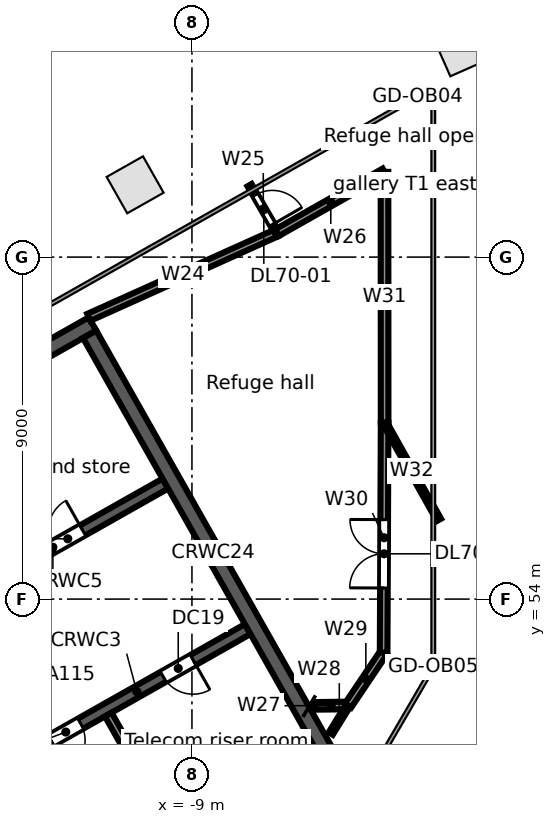
"""IFC4 building model, lengths in metres.
Left out: names, types, materials, properties, quantities, classifications, styles, units other than length and angle.
Written with IfcOpenShell. Run it as: python <this file> out.ifc"""

import sys

from ifc_helpers import new_model, si_unit, direction, frame, frame_2d, origin, origin_2d, place, context, subcontext, project, spatial, rectangle, extrude, element, fill, save


model = new_model("IFC4")
c1 = context("Model", 3, precision=1e-05, world=origin(), true_north=direction((0.0, 1.0)))
c2 = subcontext(c1, "Body", "Model", "MODEL_VIEW")
j1 = project(units=[si_unit("LENGTHUNIT", "METRE"), si_unit("PLANEANGLEUNIT", "RADIAN")], contexts=[c1])
p1 = place(None, origin())
s1 = spatial("IfcSite", under=j1, at=p1, CompositionType="ELEMENT")
p2 = place(p1, origin())
s2 = spatial("IfcBuilding", under=s1, at=p2, CompositionType="ELEMENT")
p3 = place(p2, frame((0.0, 0.0, 312.1)))
s3 = spatial("IfcBuildingStorey", under=s2, at=p3, CompositionType="ELEMENT", Elevation=312.1)
for number, where, z_axis, x_axis in (
    (1, (-10.495, 64.902, 0.0), (0.0, 0.0, 1.0), (-0.87, -0.492, 0.0)),
    (2, (-1.92, 68.483, 0.0), (0.0, 0.0, 1.0), (-0.915, -0.404, 0.0)),
):
    element("IfcColumn", number, at=place(p3, frame(where, z_axis=z_axis, x_axis=x_axis)), inside=s3, PredefinedType="COLUMN", context=c2, shape_type="SweptSolid", body=[
        extrude(rectangle(XDim=1.1, YDim=1.1, at=origin_2d()), origin(), (0.0, 0.0, 1.0), 4.4),
    ])
p4 = place(p3, frame((-13.365, 49.911, 0.0), z_axis=(0.0, 0.0, 1.0), x_axis=(0.870347618718, 0.492437836272, 0.0)))
e3 = element("IfcWall", 3, at=p4, inside=s3, PredefinedType="SOLIDWALL", context=c2, shape_type="SweptSolid", body=[
    extrude(rectangle(XDim=6.7, YDim=0.3, at=frame_2d((3.35, 0.0))), origin(), (0.0, 0.0, 1.0), 4.12),
])
p5 = place(p4, frame((0.75, 0.0, 0.0)))
e4 = element("IfcOpeningElement", 4, at=p5, cuts=e3, PredefinedType="OPENING", context=c2, shape_type="SweptSolid", body=[
    extrude(rectangle(XDim=0.9, YDim=2.1, at=frame_2d((0.45, 1.05))), frame((0.0, 0.16, 0.0), z_axis=(0.0, -1.0, 0.0), x_axis=(1.0, 0.0, 0.0)), (0.0, 0.0, 1.0), 0.32),
])
p6 = place(p4, frame((4.15, 0.0, 0.0)))
e5 = element("IfcOpeningElement", 5, at=p6, cuts=e3, PredefinedType="OPENING", context=c2, shape_type="SweptSolid", body=[
    extrude(rectangle(XDim=0.9, YDim=2.1, at=frame_2d((0.45, 1.05))), frame((0.0, 0.16, 0.0), z_axis=(0.0, -1.0, 0.0), x_axis=(1.0, 0.0, 0.0)), (0.0, 0.0, 1.0), 0.32),
])
p7 = place(p3, frame((-15.618, 53.691, 0.0), z_axis=(0.0, 0.0, 1.0), x_axis=(0.870362830851, 0.492410948978, 0.0)))
e6 = element("IfcWall", 6, at=p7, inside=s3, PredefinedType="SOLIDWALL", context=c2, shape_type="SweptSolid", body=[
    extrude(rectangle(XDim=6.8, YDim=0.3, at=frame_2d((3.4, 0.0))), origin(), (0.0, 0.0, 1.0), 4.12),
])
p8 = place(p7, frame((3.4, 0.0, 0.0)))
e7 = element("IfcOpeningElement", 7, at=p8, cuts=e6, PredefinedType="OPENING", context=c2, shape_type="SweptSolid", body=[
    extrude(rectangle(XDim=0.9, YDim=2.1, at=frame_2d((0.45, 1.05))), frame((0.0, 0.16, 0.0), z_axis=(0.0, -1.0, 0.0), x_axis=(1.0, 0.0, 0.0)), (0.0, 0.0, 1.0), 0.32),
])
p9 = place(p3, frame((-24.672, 53.854, 0.0), z_axis=(0.0, 0.0, 1.0), x_axis=(0.870353598469, 0.492427267353, 0.0)))
e8 = element("IfcWall", 8, at=p9, inside=s3, PredefinedType="SOLIDWALL", context=c2, shape_type="SweptSolid", body=[
    extrude(rectangle(XDim=15.0, YDim=0.4, at=frame_2d((7.5, 0.0))), origin(), (0.0, 0.0, 1.0), 4.12),
])
p10 = place(p3, frame((-11.202, 50.962, 0.0), z_axis=(0.0, 0.0, 1.0), x_axis=(0.492441437811, -0.870345580977, 0.0)))
e9 = element("IfcWall", 9, at=p10, inside=s3, PredefinedType="PARTITIONING", context=c2, shape_type="SweptSolid", body=[
    extrude(rectangle(XDim=4.25, YDim=0.2, at=frame_2d((2.125, 0.0))), origin(), (0.0, 0.0, 1.0), 4.12),
])
p11 = place(p3, frame((-11.692, 60.968, 0.0), z_axis=(0.0, 0.0, 1.0), x_axis=(0.492421663121, -0.870356769198, 0.0)))
e10 = element("IfcWall", 10, at=p11, inside=s3, PredefinedType="SOLIDWALL", context=c2, shape_type="SweptSolid", body=[
    extrude(rectangle(XDim=13.2, YDim=0.4, at=frame_2d((6.6, 0.0))), origin(), (0.0, 0.0, 1.0), 4.12),
])
p12 = place(p3, frame((-11.715, 61.414, 0.0), z_axis=(0.0, 0.0, 1.0), x_axis=(0.911945048706, 0.410312354361, 0.0)))
e11 = element("IfcWall", 11, at=p12, inside=s3, PredefinedType="PARTITIONING", context=c2, shape_type="SweptSolid", body=[
    extrude(rectangle(XDim=5.432, YDim=0.2, at=frame_2d((2.716, 0.0))), origin(), (0.0, 0.0, 1.0), 4.12),
])
p13 = place(p3, frame((-7.484, 64.894, 0.0), z_axis=(0.0, 0.0, 1.0), x_axis=(0.500336716268, -0.865830913258, 0.0)))
e12 = element("IfcWall", 12, at=p13, inside=s3, PredefinedType="PARTITIONING", context=c2, shape_type="SweptSolid", body=[
    extrude(rectangle(XDim=1.445, YDim=0.125, at=frame_2d((0.722, 0.0))), origin(), (0.0, 0.0, 1.0), 4.12),
])
p14 = place(p13, frame((0.3, 0.0, 0.0)))
e13 = element("IfcOpeningElement", 13, at=p14, cuts=e12, PredefinedType="OPENING", context=c2, shape_type="SweptSolid", body=[
    extrude(rectangle(XDim=0.9, YDim=2.1, at=frame_2d((0.45, 1.05))), frame((0.0, 0.073, 0.0), z_axis=(0.0, -1.0, 0.0), x_axis=(1.0, 0.0, 0.0)), (0.0, 0.0, 1.0), 0.145),
])
p15 = place(p3, frame((-6.761, 63.643, 0.0), z_axis=(0.0, 0.0, 1.0), x_axis=(0.870366841372, 0.492403860098, 0.0)))
e14 = element("IfcWall", 14, at=p15, inside=s3, PredefinedType="PARTITIONING", context=c2, shape_type="SweptSolid", body=[
    extrude(rectangle(XDim=3.249, YDim=0.2, at=frame_2d((1.625, 0.0))), origin(), (0.0, 0.0, 1.0), 4.12),
])
p16 = place(p3, frame((-5.758, 51.19, 0.0), z_axis=(0.0, 0.0, 1.0), x_axis=(0.999929677687, 0.011859160192, 0.0)))
e15 = element("IfcWall", 15, at=p16, inside=s3, PredefinedType="PARTITIONING", context=c2, shape_type="SweptSolid", body=[
    extrude(rectangle(XDim=0.844, YDim=0.2, at=frame_2d((0.422, 0.0))), origin(), (0.0, 0.0, 1.0), 3.886),
])
p17 = place(p3, frame((-5.347, 50.463, 0.0), z_axis=(0.0, 0.0, 1.0), x_axis=(0.525419885988, 0.850843078016, 0.0)))
e16 = element("IfcWall", 16, at=p17, inside=s3, PredefinedType="PARTITIONING", context=c2, shape_type="SweptSolid", body=[
    extrude(rectangle(XDim=0.854, YDim=0.125, at=frame_2d((0.427, 0.0))), origin(), (0.0, 0.0, 1.0), 3.886),
])
p18 = place(p3, frame((-4.892, 51.2, 0.0), z_axis=(0.0, 0.0, 1.0), x_axis=(0.557987221871, 0.829849540717, 0.0)))
e17 = element("IfcWall", 17, at=p18, inside=s3, PredefinedType="PARTITIONING", context=c2, shape_type="SweptSolid", body=[
    extrude(rectangle(XDim=1.677, YDim=0.2, at=frame_2d((0.839, 0.0))), origin(), (0.0, 0.0, 1.0), 4.12),
])
p19 = place(p3, frame((-3.956, 52.592, 0.0), z_axis=(0.0, 0.0, 1.0), x_axis=(0.004320747909, 0.999990665525, 0.0)))
e18 = element("IfcWall", 18, at=p19, inside=s3, PredefinedType="PARTITIONING", context=c2, shape_type="SweptSolid", body=[
    extrude(rectangle(XDim=6.046, YDim=0.2, at=frame_2d((3.023, 0.0))), origin(), (0.0, 0.0, 1.0), 3.4),
])
p20 = place(p19, frame((1.7, 0.0, 0.0)))
e19 = element("IfcOpeningElement", 19, at=p20, cuts=e18, PredefinedType="OPENING", context=c2, shape_type="SweptSolid", body=[
    extrude(rectangle(XDim=1.8, YDim=2.1, at=frame_2d((0.9, 1.05))), frame((0.0, 0.11, 0.0), z_axis=(0.0, -1.0, 0.0), x_axis=(1.0, 0.0, 0.0)), (0.0, 0.0, 1.0), 0.22),
])
p21 = place(p3, frame((-3.933, 65.243, 0.0), z_axis=(0.0, 0.0, 1.0), x_axis=(0.000480520385, -0.99999988455, 0.0)))
e20 = element("IfcWall", 20, at=p21, inside=s3, PredefinedType="PARTITIONING", context=c2, shape_type="SweptSolid", body=[
    extrude(rectangle(XDim=6.605, YDim=0.2, at=frame_2d((3.302, 0.0))), origin(), (0.0, 0.0, 1.0), 3.3),
])
p22 = place(p3, frame((-3.93, 58.638, 0.0), z_axis=(0.0, 0.0, 1.0), x_axis=(0.488671964057, -0.872467599137, 0.0)))
e21 = element("IfcWall", 21, at=p22, inside=s3, PredefinedType="PARTITIONING", context=c2, shape_type="SweptSolid", body=[
    extrude(rectangle(XDim=2.926, YDim=0.125, at=frame_2d((1.463, 0.0))), origin(), (0.0, 0.0, 1.0), 3.4),
])
p23 = place(p8, origin())
e22 = element("IfcDoor", 22, at=p23, inside=s3, OperationType="SINGLE_SWING_RIGHT", PredefinedType="DOOR", context=c2, shape_type="SweptSolid", body=[
    extrude(rectangle(XDim=0.9, YDim=2.1, at=frame_2d((0.45, 1.05))), frame((0.0, 0.025, 0.0), z_axis=(0.0, -1.0, 0.0), x_axis=(1.0, 0.0, 0.0)), (0.0, 0.0, 1.0), 0.05),
])
fill(e7, e22)
p24 = place(p5, frame((0.9, 0.0, 0.0), z_axis=(0.0, 0.0, 1.0), x_axis=(-1.0, 0.0, 0.0)))
e23 = element("IfcDoor", 23, at=p24, inside=s3, OperationType="SINGLE_SWING_RIGHT", PredefinedType="DOOR", context=c2, shape_type="SweptSolid", body=[
    extrude(rectangle(XDim=0.9, YDim=2.1, at=frame_2d((0.45, 1.05))), frame((0.0, 0.025, 0.0), z_axis=(0.0, -1.0, 0.0), x_axis=(1.0, 0.0, 0.0)), (0.0, 0.0, 1.0), 0.05),
])
fill(e4, e23)
p25 = place(p6, frame((0.9, 0.0, 0.0), z_axis=(0.0, 0.0, 1.0), x_axis=(-1.0, 0.0, 0.0)))
e24 = element("IfcDoor", 24, at=p25, inside=s3, OperationType="SINGLE_SWING_LEFT", PredefinedType="DOOR", context=c2, shape_type="SweptSolid", body=[
    extrude(rectangle(XDim=0.9, YDim=2.1, at=frame_2d((0.45, 1.05))), frame((0.0, 0.025, 0.0), z_axis=(0.0, -1.0, 0.0), x_axis=(1.0, 0.0, 0.0)), (0.0, 0.0, 1.0), 0.05),
])
fill(e5, e24)
p26 = place(p14, origin())
e25 = element("IfcDoor", 25, at=p26, inside=s3, OperationType="SINGLE_SWING_RIGHT", PredefinedType="DOOR", context=c2, shape_type="SweptSolid", body=[
    extrude(rectangle(XDim=0.9, YDim=2.1, at=frame_2d((0.45, 1.05))), frame((0.0, 0.025, 0.0), z_axis=(0.0, -1.0, 0.0), x_axis=(1.0, 0.0, 0.0)), (0.0, 0.0, 1.0), 0.05),
])
fill(e13, e25)
p27 = place(p20, origin())
e26 = element("IfcDoor", 26, at=p27, inside=s3, OperationType="DOUBLE_DOOR_SINGLE_SWING", PredefinedType="DOOR", context=c2, shape_type="SweptSolid", body=[
    extrude(rectangle(XDim=1.8, YDim=2.1, at=frame_2d((0.9, 1.05))), frame((0.0, 0.025, 0.0), z_axis=(0.0, -1.0, 0.0), x_axis=(1.0, 0.0, 0.0)), (0.0, 0.0, 1.0), 0.05),
])
fill(e19, e26)
save(model, sys.argv[1])
